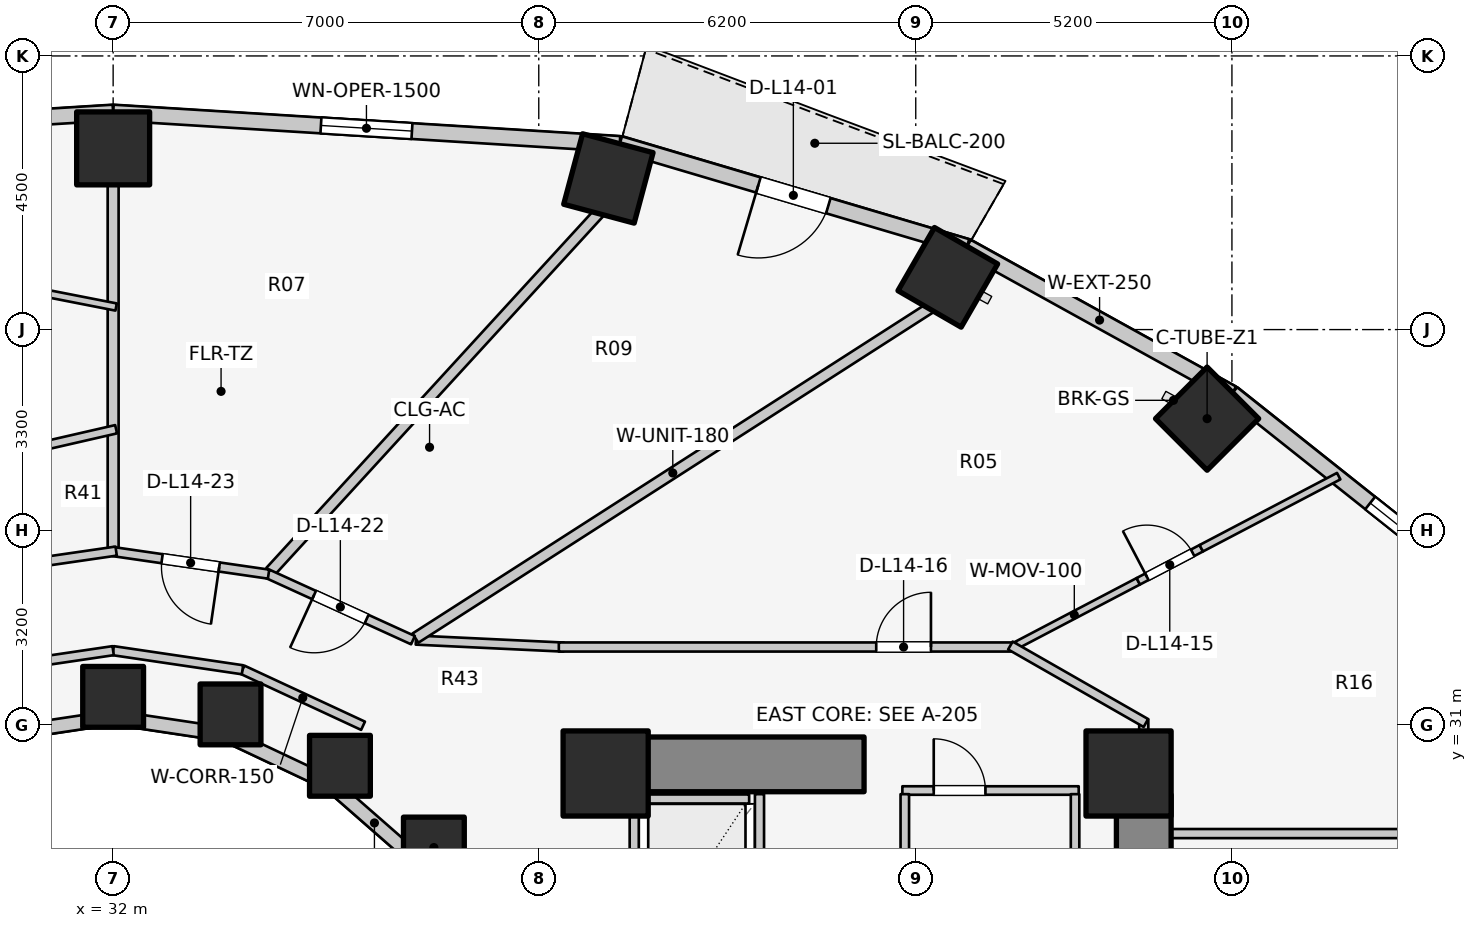
"""IFC4 building model, lengths in metres.
Left out: names, types, materials, properties, quantities, classifications, styles, units other than length and angle.
Written with IfcOpenShell. Run it as: python <this file> out.ifc"""

import sys

from ifc_helpers import new_model, si_unit, direction, frame, frame_2d, origin, origin_2d, place, context, subcontext, project, spatial, rectangle, extrude, element, fill, save


model = new_model("IFC4")
c1 = context("Model", 3, precision=1e-05, world=origin(), true_north=direction((0.0, 1.0)))
c2 = subcontext(c1, "Body", "Model", "MODEL_VIEW")
j1 = project(units=[si_unit("LENGTHUNIT", "METRE"), si_unit("PLANEANGLEUNIT", "RADIAN")], contexts=[c1])
p1 = place(None, origin())
s1 = spatial("IfcSite", under=j1, at=p1, CompositionType="ELEMENT")
p2 = place(p1, origin())
s2 = spatial("IfcBuilding", under=s1, at=p2, CompositionType="ELEMENT")
p3 = place(p2, frame((0.0, 0.0, 49.3)))
s3 = spatial("IfcBuildingStorey", under=s2, at=p3, CompositionType="ELEMENT", Elevation=49.3)
p4 = place(p3, frame((48.95, 17.05, 0.0), z_axis=(0.0, 0.0, 1.0), x_axis=(0.0, 1.0, 0.0)))
e1 = element("IfcWall", 1, at=p4, inside=s3, PredefinedType="SHEAR", context=c2, shape_type="SweptSolid", body=[
    extrude(rectangle(XDim=12.8, YDim=0.9, at=frame_2d((6.4, 0.0))), origin(), (0.0, 0.0, 1.0), 3.1),
])
p5 = place(p3, frame((39.85, 30.35, 0.0), z_axis=(0.0, 0.0, 1.0), x_axis=(1.0, 0.0, 0.0)))
e2 = element("IfcWall", 2, at=p5, inside=s3, PredefinedType="SHEAR", context=c2, shape_type="SweptSolid", body=[
    extrude(rectangle(XDim=4.5, YDim=0.9, at=frame_2d((2.25, 0.0))), origin(), (0.0, 0.0, 1.0), 3.1),
])
for number, where, z_axis, x_axis in (
    (3, (48.7, 30.2, 0.0), (0.0, 0.0, 1.0), (1.0, 0.0, 0.0)),
    (4, (40.1, 30.2, 0.0), (0.0, 0.0, 1.0), (1.0, 0.0, 0.0)),
):
    element("IfcColumn", number, at=place(p3, frame(where, z_axis=z_axis, x_axis=x_axis)), inside=s3, PredefinedType="COLUMN", context=c2, shape_type="SweptSolid", body=[
        extrude(rectangle(XDim=1.4, YDim=1.4, at=origin_2d()), origin(), (0.0, 0.0, 1.0), 3.1),
    ])
p6 = place(p3, frame((37.275, 28.982, 0.0), z_axis=(0.0, 0.0, 1.0), x_axis=(1.0, 0.0, 0.0)))
e5 = element("IfcColumn", 5, at=p6, inside=s3, PredefinedType="COLUMN", context=c2, shape_type="SweptSolid", body=[
    extrude(rectangle(XDim=1.0, YDim=1.0, at=origin_2d()), origin(), (0.0, 0.0, 1.0), 3.1),
])
p7 = place(p3, frame((49.992, 36.035, 0.0), z_axis=(0.0, 0.0, 1.0), x_axis=(0.707106781187, 0.707106781187, 0.0)))
e6 = element("IfcColumn", 6, at=p7, inside=s3, PredefinedType="COLUMN", context=c2, shape_type="SweptSolid", body=[
    extrude(rectangle(XDim=1.2, YDim=1.2, at=origin_2d()), origin(), (0.0, 0.0, 1.0), 3.1),
])
p8 = place(p3, frame((35.73, 30.327, 0.0), z_axis=(0.0, 0.0, 1.0), x_axis=(1.0, 0.0, 0.0)))
e7 = element("IfcColumn", 7, at=p8, inside=s3, PredefinedType="COLUMN", context=c2, shape_type="SweptSolid", body=[
    extrude(rectangle(XDim=1.0, YDim=1.0, at=origin_2d()), origin(), (0.0, 0.0, 1.0), 3.1),
])
p9 = place(p3, frame((45.727, 38.359, 0.0), z_axis=(0.0, 0.0, 1.0), x_axis=(0.5, 0.866025403784, 0.0)))
e8 = element("IfcColumn", 8, at=p9, inside=s3, PredefinedType="COLUMN", context=c2, shape_type="SweptSolid", body=[
    extrude(rectangle(XDim=1.2, YDim=1.2, at=origin_2d()), origin(), (0.0, 0.0, 1.0), 3.1),
])
p10 = place(p3, frame((33.931, 31.172, 0.0), z_axis=(0.0, 0.0, 1.0), x_axis=(1.0, 0.0, 0.0)))
e9 = element("IfcColumn", 9, at=p10, inside=s3, PredefinedType="COLUMN", context=c2, shape_type="SweptSolid", body=[
    extrude(rectangle(XDim=1.0, YDim=1.0, at=origin_2d()), origin(), (0.0, 0.0, 1.0), 3.1),
])
p11 = place(p3, frame((40.145, 39.986, 0.0), z_axis=(0.0, 0.0, 1.0), x_axis=(0.258819045103, 0.965925826289, 0.0)))
e10 = element("IfcColumn", 10, at=p11, inside=s3, PredefinedType="COLUMN", context=c2, shape_type="SweptSolid", body=[
    extrude(rectangle(XDim=1.2, YDim=1.2, at=origin_2d()), origin(), (0.0, 0.0, 1.0), 3.1),
])
p12 = place(p3, frame((32.0, 31.46, 0.0), z_axis=(0.0, 0.0, 1.0), x_axis=(1.0, 0.0, 0.0)))
e11 = element("IfcColumn", 11, at=p12, inside=s3, PredefinedType="COLUMN", context=c2, shape_type="SweptSolid", body=[
    extrude(rectangle(XDim=1.0, YDim=1.0, at=origin_2d()), origin(), (0.0, 0.0, 1.0), 3.1),
])
p13 = place(p3, frame((32.0, 40.48, 0.0), z_axis=(0.0, 0.0, 1.0), x_axis=(0.0, 1.0, 0.0)))
e12 = element("IfcColumn", 12, at=p13, inside=s3, PredefinedType="COLUMN", context=c2, shape_type="SweptSolid", body=[
    extrude(rectangle(XDim=1.2, YDim=1.2, at=origin_2d()), origin(), (0.0, 0.0, 1.0), 3.1),
])
p14 = place(p3, frame((37.035, 28.742, 0.0), z_axis=(0.0, 0.0, 1.0), x_axis=(-0.752576694707, 0.658504607869, 0.0)))
e13 = element("IfcWall", 13, at=p14, inside=s3, PredefinedType="STANDARD", context=c2, shape_type="SweptSolid", body=[
    extrude(rectangle(XDim=1.959, YDim=0.23, at=frame_2d((0.98, 0.0))), origin(), (0.0, 0.0, 1.0), 2.16),
])
p15 = place(p3, frame((35.56, 30.032, 0.0), z_axis=(0.0, 0.0, 1.0), x_axis=(-0.904179699603, 0.427152280606, 0.0)))
e14 = element("IfcWall", 14, at=p15, inside=s3, PredefinedType="STANDARD", context=c2, shape_type="SweptSolid", body=[
    extrude(rectangle(XDim=1.899, YDim=0.23, at=frame_2d((0.95, 0.0))), origin(), (0.0, 0.0, 1.0), 2.16),
])
for number, where, z_axis, x_axis in (
    (15, (33.843, 30.843, 0.0), (0.0, 0.0, 1.0), (-0.989, 0.149, 0.0)),
    (16, (32.0, 31.12, 0.0), (0.0, 0.0, 1.0), (-0.989, -0.149, 0.0)),
):
    element("IfcWall", number, at=place(p3, frame(where, z_axis=z_axis, x_axis=x_axis)), inside=s3, PredefinedType="STANDARD", context=c2, shape_type="SweptSolid", body=[
        extrude(rectangle(XDim=1.864, YDim=0.23, at=frame_2d((0.932, 0.0))), origin(), (0.0, 0.0, 1.0), 2.16),
    ])
p16 = place(p3, frame((54.194, 33.441, 0.0), z_axis=(0.0, 0.0, 1.0), x_axis=(-0.783123133379, 0.621866672179, 0.0)))
e17 = element("IfcWall", 17, at=p16, inside=s3, PredefinedType="STANDARD", context=c2, shape_type="SweptSolid", body=[
    extrude(rectangle(XDim=4.839, YDim=0.26, at=frame_2d((2.419, 0.0))), origin(), (0.0, 0.0, 1.0), 2.85),
])
p17 = place(p16, frame((0.741, 0.0, 0.75)))
e18 = element("IfcOpeningElement", 18, at=p17, cuts=e17, PredefinedType="OPENING", context=c2, shape_type="SweptSolid", body=[
    extrude(rectangle(XDim=1.2, YDim=1.5, at=frame_2d((0.6, 0.75))), frame((0.0, 0.14, 0.0), z_axis=(0.0, -1.0, 0.0), x_axis=(1.0, 0.0, 0.0)), (0.0, 0.0, 1.0), 0.28),
])
p18 = place(p3, frame((50.405, 36.45, 0.0), z_axis=(0.0, 0.0, 1.0), x_axis=(-0.875137303239, 0.483874674352, 0.0)))
e19 = element("IfcWall", 19, at=p18, inside=s3, PredefinedType="STANDARD", context=c2, shape_type="SweptSolid", body=[
    extrude(rectangle(XDim=4.985, YDim=0.26, at=frame_2d((2.493, 0.0))), origin(), (0.0, 0.0, 1.0), 2.85),
])
p19 = place(p3, frame((46.042, 38.862, 0.0), z_axis=(0.0, 0.0, 1.0), x_axis=(-0.958843593522, 0.283934786811, 0.0)))
e20 = element("IfcWall", 20, at=p19, inside=s3, PredefinedType="STANDARD", context=c2, shape_type="SweptSolid", body=[
    extrude(rectangle(XDim=5.955, YDim=0.26, at=frame_2d((2.978, 0.0))), origin(), (0.0, 0.0, 1.0), 2.88),
])
p20 = place(p19, frame((2.378, 0.0, 0.0)))
e21 = element("IfcOpeningElement", 21, at=p20, cuts=e20, PredefinedType="OPENING", context=c2, shape_type="SweptSolid", body=[
    extrude(rectangle(XDim=1.2, YDim=2.2, at=frame_2d((0.6, 1.1))), frame((0.0, 0.14, 0.0), z_axis=(0.0, -1.0, 0.0), x_axis=(1.0, 0.0, 0.0)), (0.0, 0.0, 1.0), 0.28),
])
p21 = place(p3, frame((40.332, 40.553, 0.0), z_axis=(0.0, 0.0, 1.0), x_axis=(-0.998090514779, 0.061768311519, 0.0)))
e22 = element("IfcWall", 22, at=p21, inside=s3, PredefinedType="STANDARD", context=c2, shape_type="SweptSolid", body=[
    extrude(rectangle(XDim=8.348, YDim=0.26, at=frame_2d((4.174, 0.0))), origin(), (0.0, 0.0, 1.0), 2.85),
])
p22 = place(p21, frame((3.424, 0.0, 0.75)))
e23 = element("IfcOpeningElement", 23, at=p22, cuts=e22, PredefinedType="OPENING", context=c2, shape_type="SweptSolid", body=[
    extrude(rectangle(XDim=1.5, YDim=1.6, at=frame_2d((0.75, 0.8))), frame((0.0, 0.14, 0.0), z_axis=(0.0, -1.0, 0.0), x_axis=(1.0, 0.0, 0.0)), (0.0, 0.0, 1.0), 0.28),
])
p23 = place(p3, frame((32.0, 41.069, 0.0), z_axis=(0.0, 0.0, 1.0), x_axis=(-0.998090514779, -0.061768311519, 0.0)))
e24 = element("IfcWall", 24, at=p23, inside=s3, PredefinedType="STANDARD", context=c2, shape_type="SweptSolid", body=[
    extrude(rectangle(XDim=8.348, YDim=0.26, at=frame_2d((4.174, 0.0))), origin(), (0.0, 0.0, 1.0), 2.85),
])
p24 = place(p23, frame((3.424, 0.0, 0.75)))
e25 = element("IfcOpeningElement", 25, at=p24, cuts=e24, PredefinedType="OPENING", context=c2, shape_type="SweptSolid", body=[
    extrude(rectangle(XDim=1.5, YDim=1.6, at=frame_2d((0.75, 0.8))), frame((0.0, 0.14, 0.0), z_axis=(0.0, -1.0, 0.0), x_axis=(1.0, 0.0, 0.0)), (0.0, 0.0, 1.0), 0.28),
])
p25 = place(p3, frame((40.74, 29.78, 0.0), z_axis=(0.0, 0.0, 1.0), x_axis=(1.0, 0.0, 0.0)))
e26 = element("IfcWall", 26, at=p25, inside=s3, PredefinedType="SOLIDWALL", context=c2, shape_type="SweptSolid", body=[
    extrude(rectangle(XDim=1.72, YDim=0.15, at=frame_2d((0.86, 0.0))), origin(), (0.0, 0.0, 1.0), 2.855),
])
for number, where, z_axis, x_axis in (
    (27, (40.57, 27.14, 0.0), (0.0, 0.0, 1.0), (0.0, 1.0, 0.0)),
    (28, (42.63, 27.14, 0.0), (0.0, 0.0, 1.0), (0.0, 1.0, 0.0)),
):
    element("IfcWall", number, at=place(p3, frame(where, z_axis=z_axis, x_axis=x_axis)), inside=s3, PredefinedType="SOLIDWALL", context=c2, shape_type="SweptSolid", body=[
        extrude(rectangle(XDim=2.72, YDim=0.15, at=frame_2d((1.36, 0.0))), origin(), (0.0, 0.0, 1.0), 2.855),
    ])
p26 = place(p3, frame((44.98, 29.92, 0.0), z_axis=(0.0, 0.0, 1.0), x_axis=(1.0, 0.0, 0.0)))
e29 = element("IfcWall", 29, at=p26, inside=s3, PredefinedType="PLUMBINGWALL", context=c2, shape_type="SweptSolid", body=[
    extrude(rectangle(XDim=2.9, YDim=0.14, at=frame_2d((1.45, 0.0))), origin(), (0.0, 0.0, 1.0), 2.855),
])
p27 = place(p26, frame((0.516, 0.0, 0.0)))
e30 = element("IfcOpeningElement", 30, at=p27, cuts=e29, PredefinedType="OPENING", context=c2, shape_type="SweptSolid", body=[
    extrude(rectangle(XDim=0.85, YDim=2.05, at=frame_2d((0.425, 1.025))), frame((0.0, 0.08, 0.0), z_axis=(0.0, -1.0, 0.0), x_axis=(1.0, 0.0, 0.0)), (0.0, 0.0, 1.0), 0.16),
])
for number, where, z_axis, x_axis in (
    (31, (45.02, 25.98, 0.0), (0.0, 0.0, 1.0), (0.0, 1.0, 0.0)),
    (32, (47.82, 25.98, 0.0), (0.0, 0.0, 1.0), (0.0, 1.0, 0.0)),
):
    element("IfcWall", number, at=place(p3, frame(where, z_axis=z_axis, x_axis=x_axis)), inside=s3, PredefinedType="PLUMBINGWALL", context=c2, shape_type="SweptSolid", body=[
        extrude(rectangle(XDim=3.88, YDim=0.14, at=frame_2d((1.94, 0.0))), origin(), (0.0, 0.0, 1.0), 2.855),
    ])
p28 = place(p3, frame((36.11, 30.985, 0.0), z_axis=(0.0, 0.0, 1.0), x_axis=(-0.906943449489, 0.421252393975, 0.0)))
e33 = element("IfcWall", 33, at=p28, inside=s3, PredefinedType="PARTITIONING", context=c2, shape_type="SweptSolid", body=[
    extrude(rectangle(XDim=2.186, YDim=0.15, at=frame_2d((1.093, 0.0))), origin(), (0.0, 0.0, 1.0), 2.237),
])
for number, where, z_axis, x_axis in (
    (34, (34.127, 31.906, 0.0), (0.0, 0.0, 1.0), (-0.989, 0.146, 0.0)),
    (35, (32.0, 32.22, 0.0), (0.0, 0.0, 1.0), (-0.989, -0.146, 0.0)),
):
    element("IfcWall", number, at=place(p3, frame(where, z_axis=z_axis, x_axis=x_axis)), inside=s3, PredefinedType="PARTITIONING", context=c2, shape_type="SweptSolid", body=[
        extrude(rectangle(XDim=2.151, YDim=0.15, at=frame_2d((1.075, 0.0))), origin(), (0.0, 0.0, 1.0), 2.237),
    ])
p29 = place(p3, frame((48.95, 29.212, 0.0), z_axis=(0.0, 0.0, 1.0), x_axis=(1.0, 0.0, 0.0)))
e36 = element("IfcWall", 36, at=p29, inside=s3, PredefinedType="PARTITIONING", context=c2, shape_type="SweptSolid", body=[
    extrude(rectangle(XDim=8.036, YDim=0.15, at=frame_2d((4.018, 0.0))), origin(), (0.0, 0.0, 1.0), 2.855),
])
p30 = place(p3, frame((48.95, 29.8, 0.0), z_axis=(0.0, 0.0, 1.0), x_axis=(0.0, 1.0, 0.0)))
e37 = element("IfcWall", 37, at=p30, inside=s3, PredefinedType="PARTITIONING", context=c2, shape_type="SweptSolid", body=[
    extrude(rectangle(XDim=1.29, YDim=0.15, at=frame_2d((0.645, 0.0))), origin(), (0.0, 0.0, 1.0), 2.069),
])
p31 = place(p3, frame((46.756, 32.257, 0.0), z_axis=(0.0, 0.0, 1.0), x_axis=(0.885586030676, 0.464475383924, 0.0)))
e38 = element("IfcWall", 38, at=p31, inside=s3, PredefinedType="MOVABLE", context=c2, shape_type="SweptSolid", body=[
    extrude(rectangle(XDim=2.376, YDim=0.12, at=frame_2d((1.188, 0.0))), origin(), (0.0, 0.0, 1.0), 2.855),
])
p32 = place(p3, frame((48.86, 33.36, 0.0), z_axis=(0.0, 0.0, 1.0), x_axis=(0.885447282698, 0.464739829972, 0.0)))
e39 = element("IfcWall", 39, at=p32, inside=s3, PredefinedType="MOVABLE", context=c2, shape_type="SweptSolid", body=[
    extrude(rectangle(XDim=1.17, YDim=0.12, at=frame_2d((0.585, 0.0))), origin(), (0.0, 0.0, 1.0), 2.11),
])
p33 = place(p32, frame((0.16, 0.0, 0.0)))
e40 = element("IfcOpeningElement", 40, at=p33, cuts=e39, PredefinedType="OPENING", context=c2, shape_type="SweptSolid", body=[
    extrude(rectangle(XDim=0.85, YDim=2.05, at=frame_2d((0.425, 1.025))), frame((0.0, 0.07, 0.0), z_axis=(0.0, -1.0, 0.0), x_axis=(1.0, 0.0, 0.0)), (0.0, 0.0, 1.0), 0.14),
])
p34 = place(p3, frame((49.896, 33.904, 0.0), z_axis=(0.0, 0.0, 1.0), x_axis=(0.885573027611, 0.464500175208, 0.0)))
e41 = element("IfcWall", 41, at=p34, inside=s3, PredefinedType="MOVABLE", context=c2, shape_type="SweptSolid", body=[
    extrude(rectangle(XDim=2.552, YDim=0.12, at=frame_2d((1.276, 0.0))), origin(), (0.0, 0.0, 1.0), 2.855),
])
p35 = place(p3, frame((36.98, 32.394, 0.0), z_axis=(0.0, 0.0, 1.0), x_axis=(0.998877427952, -0.047369651964, 0.0)))
e42 = element("IfcWall", 42, at=p35, inside=s3, PredefinedType="PARTITIONING", context=c2, shape_type="SweptSolid", body=[
    extrude(rectangle(XDim=2.433, YDim=0.15, at=frame_2d((1.216, 0.0))), origin(), (0.0, 0.0, 1.0), 2.237),
])
p36 = place(p3, frame((39.33, 32.28, 0.0), z_axis=(0.0, 0.0, 1.0), x_axis=(1.0, 0.0, 0.0)))
e43 = element("IfcWall", 43, at=p36, inside=s3, PredefinedType="PARTITIONING", context=c2, shape_type="SweptSolid", body=[
    extrude(rectangle(XDim=7.52, YDim=0.15, at=frame_2d((3.76, 0.0))), origin(), (0.0, 0.0, 1.0), 2.237),
])
p37 = place(p36, frame((5.22, 0.0, 0.0)))
e44 = element("IfcOpeningElement", 44, at=p37, cuts=e43, PredefinedType="OPENING", context=c2, shape_type="SweptSolid", body=[
    extrude(rectangle(XDim=0.9, YDim=2.1, at=frame_2d((0.45, 1.05))), frame((0.0, 0.085, 0.0), z_axis=(0.0, -1.0, 0.0), x_axis=(1.0, 0.0, 0.0)), (0.0, 0.0, 1.0), 0.17),
])
p38 = place(p3, frame((46.757, 32.305, 0.0), z_axis=(0.0, 0.0, 1.0), x_axis=(0.867991349648, -0.496579315857, 0.0)))
e45 = element("IfcWall", 45, at=p38, inside=s3, PredefinedType="PARTITIONING", context=c2, shape_type="SweptSolid", body=[
    extrude(rectangle(XDim=2.567, YDim=0.15, at=frame_2d((1.283, 0.0))), origin(), (0.0, 0.0, 1.0), 2.069),
])
p39 = place(p3, frame((36.971, 32.426, 0.0), z_axis=(0.0, 0.0, 1.0), x_axis=(0.841689919529, 0.5399611832, 0.0)))
e46 = element("IfcWall", 46, at=p39, inside=s3, PredefinedType="PARTITIONING", context=c2, shape_type="SweptSolid", body=[
    extrude(rectangle(XDim=10.058, YDim=0.18, at=frame_2d((5.029, 0.0))), origin(), (0.0, 0.0, 1.0), 2.237),
])
p40 = place(p3, frame((34.586, 33.521, 0.0), z_axis=(0.0, 0.0, 1.0), x_axis=(0.675465011224, 0.737392038615, 0.0)))
e47 = element("IfcWall", 47, at=p40, inside=s3, PredefinedType="PARTITIONING", context=c2, shape_type="SweptSolid", body=[
    extrude(rectangle(XDim=8.007, YDim=0.18, at=frame_2d((4.003, 0.0))), origin(), (0.0, 0.0, 1.0), 2.237),
])
p41 = place(p3, frame((32.0, 33.905, 0.0), z_axis=(0.0, 0.0, 1.0), x_axis=(0.0, 1.0, 0.0)))
e48 = element("IfcWall", 48, at=p41, inside=s3, PredefinedType="PARTITIONING", context=c2, shape_type="SweptSolid", body=[
    extrude(rectangle(XDim=5.995, YDim=0.18, at=frame_2d((2.998, 0.0))), origin(), (0.0, 0.0, 1.0), 2.237),
])
p42 = place(p3, frame((36.931, 32.393, 0.0), z_axis=(0.0, 0.0, 1.0), x_axis=(-0.909747571199, 0.415161843982, 0.0)))
e49 = element("IfcWall", 49, at=p42, inside=s3, PredefinedType="PARTITIONING", context=c2, shape_type="SweptSolid", body=[
    extrude(rectangle(XDim=2.625, YDim=0.15, at=frame_2d((1.312, 0.0))), origin(), (0.0, 0.0, 1.0), 2.237),
])
p43 = place(p42, frame((0.838, 0.0, 0.0)))
e50 = element("IfcOpeningElement", 50, at=p43, cuts=e49, PredefinedType="OPENING", context=c2, shape_type="SweptSolid", body=[
    extrude(rectangle(XDim=0.95, YDim=2.1, at=frame_2d((0.475, 1.05))), frame((0.0, 0.085, 0.0), z_axis=(0.0, -1.0, 0.0), x_axis=(1.0, 0.0, 0.0)), (0.0, 0.0, 1.0), 0.17),
])
p44 = place(p3, frame((34.556, 33.478, 0.0), z_axis=(0.0, 0.0, 1.0), x_axis=(-0.989637894688, 0.143585644814, 0.0)))
e51 = element("IfcWall", 51, at=p44, inside=s3, PredefinedType="PARTITIONING", context=c2, shape_type="SweptSolid", body=[
    extrude(rectangle(XDim=2.59, YDim=0.15, at=frame_2d((1.295, 0.0))), origin(), (0.0, 0.0, 1.0), 2.237),
])
p45 = place(p44, frame((0.82, 0.0, 0.0)))
e52 = element("IfcOpeningElement", 52, at=p45, cuts=e51, PredefinedType="OPENING", context=c2, shape_type="SweptSolid", body=[
    extrude(rectangle(XDim=0.95, YDim=2.1, at=frame_2d((0.475, 1.05))), frame((0.0, 0.085, 0.0), z_axis=(0.0, -1.0, 0.0), x_axis=(1.0, 0.0, 0.0)), (0.0, 0.0, 1.0), 0.17),
])
p46 = place(p3, frame((32.049, 37.871, 0.0), z_axis=(0.0, 0.0, 1.0), x_axis=(-0.981343325718, 0.192263561471, 0.0)))
e53 = element("IfcWall", 53, at=p46, inside=s3, PredefinedType="MOVABLE", context=c2, shape_type="SweptSolid", body=[
    extrude(rectangle(XDim=5.255, YDim=0.12, at=frame_2d((2.627, 0.0))), origin(), (0.0, 0.0, 1.0), 2.237),
])
p47 = place(p3, frame((32.05, 33.857, 0.0), z_axis=(0.0, 0.0, 1.0), x_axis=(-0.989649898776, -0.143502884474, 0.0)))
e54 = element("IfcWall", 54, at=p47, inside=s3, PredefinedType="PARTITIONING", context=c2, shape_type="SweptSolid", body=[
    extrude(rectangle(XDim=2.676, YDim=0.15, at=frame_2d((1.338, 0.0))), origin(), (0.0, 0.0, 1.0), 2.237),
])
p48 = place(p3, frame((32.049, 35.861, 0.0), z_axis=(0.0, 0.0, 1.0), x_axis=(-0.974672340529, -0.223637717318, 0.0)))
e55 = element("IfcWall", 55, at=p48, inside=s3, PredefinedType="PLUMBINGWALL", context=c2, shape_type="SweptSolid", body=[
    extrude(rectangle(XDim=4.101, YDim=0.14, at=frame_2d((2.051, 0.0))), origin(), (0.0, 0.0, 1.0), 2.237),
])
p49 = place(p48, frame((1.601, 0.0, 0.0)))
e56 = element("IfcOpeningElement", 56, at=p49, cuts=e55, PredefinedType="OPENING", context=c2, shape_type="SweptSolid", body=[
    extrude(rectangle(XDim=0.9, YDim=2.1, at=frame_2d((0.45, 1.05))), frame((0.0, 0.08, 0.0), z_axis=(0.0, -1.0, 0.0), x_axis=(1.0, 0.0, 0.0)), (0.0, 0.0, 1.0), 0.16),
])
p50 = place(p17, origin())
e57 = element("IfcWindow", 57, at=p50, inside=s3, PartitioningType="SINGLE_PANEL", PredefinedType="WINDOW", context=c2, shape_type="SweptSolid", body=[
    extrude(rectangle(XDim=1.2, YDim=1.5, at=frame_2d((0.6, 0.75))), frame((0.0, 0.03, 0.0), z_axis=(0.0, -1.0, 0.0), x_axis=(1.0, 0.0, 0.0)), (0.0, 0.0, 1.0), 0.06),
])
fill(e18, e57)
p51 = place(p20, origin())
e58 = element("IfcDoor", 58, at=p51, inside=s3, OperationType="SINGLE_SWING_RIGHT", PredefinedType="DOOR", context=c2, shape_type="SweptSolid", body=[
    extrude(rectangle(XDim=1.2, YDim=2.2, at=frame_2d((0.6, 1.1))), frame((0.0, 0.025, 0.0), z_axis=(0.0, -1.0, 0.0), x_axis=(1.0, 0.0, 0.0)), (0.0, 0.0, 1.0), 0.05),
])
fill(e21, e58)
p52 = place(p22, origin())
e59 = element("IfcWindow", 59, at=p52, inside=s3, PartitioningType="SINGLE_PANEL", PredefinedType="WINDOW", context=c2, shape_type="SweptSolid", body=[
    extrude(rectangle(XDim=1.5, YDim=1.6, at=frame_2d((0.75, 0.8))), frame((0.0, 0.03, 0.0), z_axis=(0.0, -1.0, 0.0), x_axis=(1.0, 0.0, 0.0)), (0.0, 0.0, 1.0), 0.06),
])
fill(e23, e59)
p53 = place(p27, origin())
e60 = element("IfcDoor", 60, at=p53, inside=s3, OperationType="SINGLE_SWING_LEFT", PredefinedType="DOOR", context=c2, shape_type="SweptSolid", body=[
    extrude(rectangle(XDim=0.85, YDim=2.05, at=frame_2d((0.425, 1.025))), frame((0.0, 0.025, 0.0), z_axis=(0.0, -1.0, 0.0), x_axis=(1.0, 0.0, 0.0)), (0.0, 0.0, 1.0), 0.05),
])
fill(e30, e60)
p54 = place(p33, origin())
e61 = element("IfcDoor", 61, at=p54, inside=s3, OperationType="SINGLE_SWING_LEFT", PredefinedType="DOOR", context=c2, shape_type="SweptSolid", body=[
    extrude(rectangle(XDim=0.85, YDim=2.05, at=frame_2d((0.425, 1.025))), frame((0.0, 0.025, 0.0), z_axis=(0.0, -1.0, 0.0), x_axis=(1.0, 0.0, 0.0)), (0.0, 0.0, 1.0), 0.05),
])
fill(e40, e61)
p55 = place(p37, origin())
e62 = element("IfcDoor", 62, at=p55, inside=s3, OperationType="SINGLE_SWING_RIGHT", PredefinedType="DOOR", context=c2, shape_type="SweptSolid", body=[
    extrude(rectangle(XDim=0.9, YDim=2.1, at=frame_2d((0.45, 1.05))), frame((0.0, 0.025, 0.0), z_axis=(0.0, -1.0, 0.0), x_axis=(1.0, 0.0, 0.0)), (0.0, 0.0, 1.0), 0.05),
])
fill(e44, e62)
p56 = place(p43, origin())
e63 = element("IfcDoor", 63, at=p56, inside=s3, OperationType="SINGLE_SWING_RIGHT", PredefinedType="DOOR", context=c2, shape_type="SweptSolid", body=[
    extrude(rectangle(XDim=0.95, YDim=2.1, at=frame_2d((0.475, 1.05))), frame((0.0, 0.025, 0.0), z_axis=(0.0, -1.0, 0.0), x_axis=(1.0, 0.0, 0.0)), (0.0, 0.0, 1.0), 0.05),
])
fill(e50, e63)
p57 = place(p45, origin())
e64 = element("IfcDoor", 64, at=p57, inside=s3, OperationType="SINGLE_SWING_LEFT", PredefinedType="DOOR", context=c2, shape_type="SweptSolid", body=[
    extrude(rectangle(XDim=0.95, YDim=2.1, at=frame_2d((0.475, 1.05))), frame((0.0, 0.025, 0.0), z_axis=(0.0, -1.0, 0.0), x_axis=(1.0, 0.0, 0.0)), (0.0, 0.0, 1.0), 0.05),
])
fill(e52, e64)
save(model, sys.argv[1])
